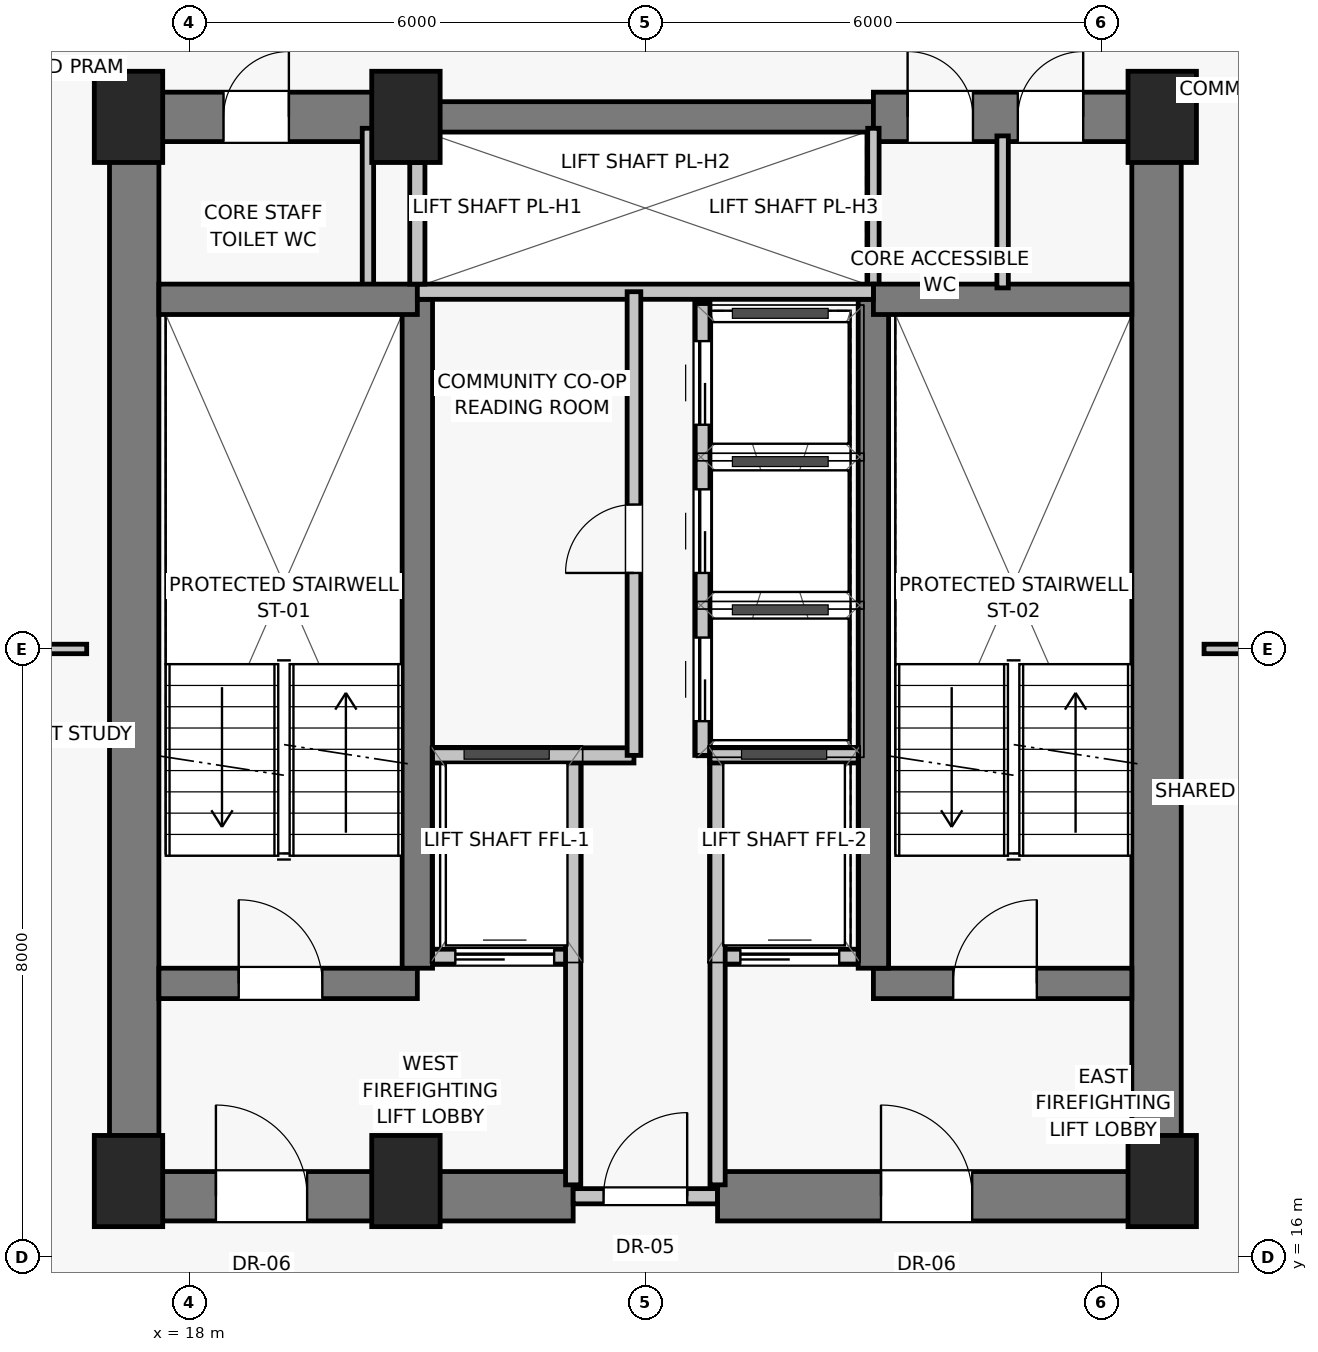
"""IFC4 building model, lengths in metres.
Left out: names, types, materials, properties, quantities, classifications, styles, units other than length and angle.
Written with IfcOpenShell. Run it as: python <this file> out.ifc"""

import sys

from ifc_helpers import new_model, si_unit, direction, frame, frame_2d, origin, origin_2d, place, context, subcontext, project, spatial, rectangle, extrude, source, transform, mapped, element, fill, save


model = new_model("IFC4")
c1 = context("Model", 3, precision=1e-05, world=origin(), true_north=direction((0.0, 1.0)))
c2 = subcontext(c1, "Body", "Model", "MODEL_VIEW")
j1 = project(units=[si_unit("LENGTHUNIT", "METRE"), si_unit("PLANEANGLEUNIT", "RADIAN")], contexts=[c1])
p1 = place(None, origin())
s1 = spatial("IfcSite", under=j1, at=p1, CompositionType="ELEMENT")
p2 = place(p1, origin())
s2 = spatial("IfcBuilding", under=s1, at=p2, CompositionType="ELEMENT")
p3 = place(p2, frame((0.0, 0.0, 95.95)))
s3 = spatial("IfcBuildingStorey", under=s2, at=p3, CompositionType="ELEMENT", Elevation=95.95)
for number, where, z_axis, x_axis in (
    (1, (17.2, 17.0, 0.0), (0.0, 0.0, 1.0), (1.0, 0.0, 0.0)),
    (2, (20.85, 17.0, 0.0), (0.0, 0.0, 1.0), (1.0, 0.0, 0.0)),
    (3, (30.8, 17.0, 0.0), (0.0, 0.0, 1.0), (1.0, 0.0, 0.0)),
    (4, (17.2, 31.0, 0.0), (0.0, 0.0, 1.0), (1.0, 0.0, 0.0)),
    (5, (20.85, 31.0, 0.0), (0.0, 0.0, 1.0), (1.0, 0.0, 0.0)),
    (6, (30.8, 31.0, 0.0), (0.0, 0.0, 1.0), (1.0, 0.0, 0.0)),
):
    element("IfcColumn", number, at=place(p3, frame(where, z_axis=z_axis, x_axis=x_axis)), inside=s3, PredefinedType="PILASTER", context=c2, shape_type="SweptSolid", body=[
        extrude(rectangle(XDim=0.9, YDim=1.2, at=origin_2d()), origin(), (0.0, 0.0, 1.0), 3.25),
    ])
for number, where, z_axis, x_axis in (
    (7, (17.275, 16.8, 0.0), (0.0, 0.0, 1.0), (0.0, 1.0, 0.0)),
    (8, (30.725, 16.8, 0.0), (0.0, 0.0, 1.0), (0.0, 1.0, 0.0)),
):
    element("IfcWall", number, at=place(p3, frame(where, z_axis=z_axis, x_axis=x_axis)), inside=s3, PredefinedType="SHEAR", context=c2, shape_type="SweptSolid", body=[
        extrude(rectangle(XDim=14.2, YDim=0.65, at=frame_2d((7.1, 0.0))), origin(), (0.0, 0.0, 1.0), 3.0),
    ])
p4 = place(p3, frame((17.2, 16.8, 0.0), z_axis=(0.0, 0.0, 1.0), x_axis=(1.0, 0.0, 0.0)))
e9 = element("IfcWall", 9, at=p4, inside=s3, PredefinedType="SHEAR", context=c2, shape_type="SweptSolid", body=[
    extrude(rectangle(XDim=5.85, YDim=0.65, at=frame_2d((2.925, 0.0))), origin(), (0.0, 0.0, 1.0), 3.0),
])
p5 = place(p4, frame((1.15, 0.0, 0.0)))
e10 = element("IfcOpeningElement", 10, at=p5, cuts=e9, PredefinedType="OPENING", context=c2, shape_type="SweptSolid", body=[
    extrude(rectangle(XDim=1.2, YDim=2.03, at=frame_2d((0.6, 1.015))), frame((0.0, 0.335, 0.0), z_axis=(0.0, -1.0, 0.0), x_axis=(1.0, 0.0, 0.0)), (0.0, 0.0, 1.0), 0.67),
])
p6 = place(p3, frame((23.05, 16.8, 0.0), z_axis=(0.0, 0.0, 1.0), x_axis=(1.0, 0.0, 0.0)))
e11 = element("IfcWall", 11, at=p6, inside=s3, PredefinedType="SOLIDWALL", context=c2, shape_type="SweptSolid", body=[
    extrude(rectangle(XDim=1.9, YDim=0.2, at=frame_2d((0.95, 0.0))), origin(), (0.0, 0.0, 1.0), 2.15),
])
p7 = place(p6, frame((0.4, 0.0, 0.0)))
e12 = element("IfcOpeningElement", 12, at=p7, cuts=e11, PredefinedType="OPENING", context=c2, shape_type="SweptSolid", body=[
    extrude(rectangle(XDim=1.1, YDim=2.03, at=frame_2d((0.55, 1.015))), frame((0.0, 0.11, 0.0), z_axis=(0.0, -1.0, 0.0), x_axis=(1.0, 0.0, 0.0)), (0.0, 0.0, 1.0), 0.22),
])
p8 = place(p3, frame((24.95, 16.8, 0.0), z_axis=(0.0, 0.0, 1.0), x_axis=(1.0, 0.0, 0.0)))
e13 = element("IfcWall", 13, at=p8, inside=s3, PredefinedType="SHEAR", context=c2, shape_type="SweptSolid", body=[
    extrude(rectangle(XDim=5.85, YDim=0.65, at=frame_2d((2.925, 0.0))), origin(), (0.0, 0.0, 1.0), 3.0),
])
p9 = place(p8, frame((2.15, 0.0, 0.0)))
e14 = element("IfcOpeningElement", 14, at=p9, cuts=e13, PredefinedType="OPENING", context=c2, shape_type="SweptSolid", body=[
    extrude(rectangle(XDim=1.2, YDim=2.03, at=frame_2d((0.6, 1.015))), frame((0.0, 0.335, 0.0), z_axis=(0.0, -1.0, 0.0), x_axis=(1.0, 0.0, 0.0)), (0.0, 0.0, 1.0), 0.67),
])
p10 = place(p3, frame((17.2, 31.0, 0.0), z_axis=(0.0, 0.0, 1.0), x_axis=(1.0, 0.0, 0.0)))
e15 = element("IfcWall", 15, at=p10, inside=s3, PredefinedType="SHEAR", context=c2, shape_type="SweptSolid", body=[
    extrude(rectangle(XDim=3.8, YDim=0.65, at=frame_2d((1.9, 0.0))), origin(), (0.0, 0.0, 1.0), 3.0),
])
p11 = place(p10, frame((1.25, 0.0, 0.0)))
e16 = element("IfcOpeningElement", 16, at=p11, cuts=e15, PredefinedType="OPENING", context=c2, shape_type="SweptSolid", body=[
    extrude(rectangle(XDim=0.86, YDim=2.01, at=frame_2d((0.43, 1.005))), frame((0.0, 0.335, 0.0), z_axis=(0.0, -1.0, 0.0), x_axis=(1.0, 0.0, 0.0)), (0.0, 0.0, 1.0), 0.67),
])
p12 = place(p3, frame((21.0, 31.0, 0.0), z_axis=(0.0, 0.0, 1.0), x_axis=(1.0, 0.0, 0.0)))
e17 = element("IfcWall", 17, at=p12, inside=s3, PredefinedType="SHEAR", context=c2, shape_type="SweptSolid", body=[
    extrude(rectangle(XDim=6.0, YDim=0.4, at=frame_2d((3.0, 0.0))), origin(), (0.0, 0.0, 1.0), 3.0),
])
p13 = place(p3, frame((27.0, 31.0, 0.0), z_axis=(0.0, 0.0, 1.0), x_axis=(1.0, 0.0, 0.0)))
e18 = element("IfcWall", 18, at=p13, inside=s3, PredefinedType="SHEAR", context=c2, shape_type="SweptSolid", body=[
    extrude(rectangle(XDim=3.8, YDim=0.65, at=frame_2d((1.9, 0.0))), origin(), (0.0, 0.0, 1.0), 3.0),
])
p14 = place(p13, frame((0.45, 0.0, 0.0)))
e19 = element("IfcOpeningElement", 19, at=p14, cuts=e18, PredefinedType="OPENING", context=c2, shape_type="SweptSolid", body=[
    extrude(rectangle(XDim=0.86, YDim=2.01, at=frame_2d((0.43, 1.005))), frame((0.0, 0.335, 0.0), z_axis=(0.0, -1.0, 0.0), x_axis=(1.0, 0.0, 0.0)), (0.0, 0.0, 1.0), 0.67),
])
p15 = place(p13, frame((1.9, 0.0, 0.0)))
e20 = element("IfcOpeningElement", 20, at=p15, cuts=e18, PredefinedType="OPENING", context=c2, shape_type="SweptSolid", body=[
    extrude(rectangle(XDim=0.86, YDim=2.01, at=frame_2d((0.43, 1.005))), frame((0.0, 0.335, 0.0), z_axis=(0.0, -1.0, 0.0), x_axis=(1.0, 0.0, 0.0)), (0.0, 0.0, 1.0), 0.67),
])
for number, where, z_axis, x_axis in (
    (21, (20.35, 28.65, 0.0), (0.0, 0.0, 1.0), (0.0, 1.0, 0.0)),
    (22, (27.0, 28.65, 0.0), (0.0, 0.0, 1.0), (0.0, 1.0, 0.0)),
):
    element("IfcWall", number, at=place(p3, frame(where, z_axis=z_axis, x_axis=x_axis)), inside=s3, PredefinedType="PARTITIONING", context=c2, shape_type="SweptSolid", body=[
        extrude(rectangle(XDim=2.2, YDim=0.15, at=frame_2d((1.1, 0.0))), origin(), (0.0, 0.0, 1.0), 3.0),
    ])
p16 = place(p3, frame((17.6, 19.6, 0.0), z_axis=(0.0, 0.0, 1.0), x_axis=(1.0, 0.0, 0.0)))
e23 = element("IfcWall", 23, at=p16, inside=s3, PredefinedType="SHEAR", context=c2, shape_type="SweptSolid", body=[
    extrude(rectangle(XDim=3.4, YDim=0.4, at=frame_2d((1.7, 0.0))), origin(), (0.0, 0.0, 1.0), 3.0),
])
p17 = place(p16, frame((1.05, 0.0, 0.0)))
e24 = element("IfcOpeningElement", 24, at=p17, cuts=e23, PredefinedType="OPENING", context=c2, shape_type="SweptSolid", body=[
    extrude(rectangle(XDim=1.1, YDim=2.03, at=frame_2d((0.55, 1.015))), frame((0.0, 0.21, 0.0), z_axis=(0.0, -1.0, 0.0), x_axis=(1.0, 0.0, 0.0)), (0.0, 0.0, 1.0), 0.42),
])
p18 = place(p3, frame((21.2, 19.95, 0.0), z_axis=(0.0, 0.0, 1.0), x_axis=(1.0, 0.0, 0.0)))
e25 = element("IfcWall", 25, at=p18, inside=s3, PredefinedType="SOLIDWALL", context=c2, shape_type="SweptSolid", body=[
    extrude(rectangle(XDim=1.85, YDim=0.2, at=frame_2d((0.925, 0.0))), origin(), (0.0, 0.0, 1.0), 3.0),
])
p19 = place(p18, frame((0.3, 0.0, 0.0)))
e26 = element("IfcOpeningElement", 26, at=p19, cuts=e25, PredefinedType="OPENING", context=c2, shape_type="SweptSolid", body=[
    extrude(rectangle(XDim=1.3, YDim=2.25, at=frame_2d((0.65, 1.125))), frame((0.0, 0.11, 0.0), z_axis=(0.0, -1.0, 0.0), x_axis=(1.0, 0.0, 0.0)), (0.0, 0.0, 1.0), 0.22),
])
p20 = place(p3, frame((24.95, 19.95, 0.0), z_axis=(0.0, 0.0, 1.0), x_axis=(1.0, 0.0, 0.0)))
e27 = element("IfcWall", 27, at=p20, inside=s3, PredefinedType="SOLIDWALL", context=c2, shape_type="SweptSolid", body=[
    extrude(rectangle(XDim=1.85, YDim=0.2, at=frame_2d((0.925, 0.0))), origin(), (0.0, 0.0, 1.0), 3.0),
])
p21 = place(p20, frame((0.3, 0.0, 0.0)))
e28 = element("IfcOpeningElement", 28, at=p21, cuts=e27, PredefinedType="OPENING", context=c2, shape_type="SweptSolid", body=[
    extrude(rectangle(XDim=1.3, YDim=2.25, at=frame_2d((0.65, 1.125))), frame((0.0, 0.11, 0.0), z_axis=(0.0, -1.0, 0.0), x_axis=(1.0, 0.0, 0.0)), (0.0, 0.0, 1.0), 0.22),
])
p22 = place(p3, frame((27.0, 19.6, 0.0), z_axis=(0.0, 0.0, 1.0), x_axis=(1.0, 0.0, 0.0)))
e29 = element("IfcWall", 29, at=p22, inside=s3, PredefinedType="SHEAR", context=c2, shape_type="SweptSolid", body=[
    extrude(rectangle(XDim=3.4, YDim=0.4, at=frame_2d((1.7, 0.0))), origin(), (0.0, 0.0, 1.0), 3.0),
])
p23 = place(p22, frame((1.05, 0.0, 0.0)))
e30 = element("IfcOpeningElement", 30, at=p23, cuts=e29, PredefinedType="OPENING", context=c2, shape_type="SweptSolid", body=[
    extrude(rectangle(XDim=1.1, YDim=2.03, at=frame_2d((0.55, 1.015))), frame((0.0, 0.21, 0.0), z_axis=(0.0, -1.0, 0.0), x_axis=(1.0, 0.0, 0.0)), (0.0, 0.0, 1.0), 0.42),
])
for number, where, z_axis, x_axis in (
    (31, (21.0, 19.8, 0.0), (0.0, 0.0, 1.0), (0.0, 1.0, 0.0)),
    (32, (27.0, 19.8, 0.0), (0.0, 0.0, 1.0), (0.0, 1.0, 0.0)),
):
    element("IfcWall", number, at=place(p3, frame(where, z_axis=z_axis, x_axis=x_axis)), inside=s3, PredefinedType="SHEAR", context=c2, shape_type="SweptSolid", body=[
        extrude(rectangle(XDim=8.8, YDim=0.4, at=frame_2d((4.4, 0.0))), origin(), (0.0, 0.0, 1.0), 3.0),
    ])
for number, where, z_axis, x_axis in (
    (33, (17.6, 28.6, 0.0), (0.0, 0.0, 1.0), (1.0, 0.0, 0.0)),
    (34, (27.0, 28.6, 0.0), (0.0, 0.0, 1.0), (1.0, 0.0, 0.0)),
):
    element("IfcWall", number, at=place(p3, frame(where, z_axis=z_axis, x_axis=x_axis)), inside=s3, PredefinedType="SHEAR", context=c2, shape_type="SweptSolid", body=[
        extrude(rectangle(XDim=3.4, YDim=0.4, at=frame_2d((1.7, 0.0))), origin(), (0.0, 0.0, 1.0), 3.0),
    ])
for number, where, z_axis, x_axis in (
    (35, (23.05, 16.95, 0.0), (0.0, 0.0, 1.0), (0.0, 1.0, 0.0)),
    (36, (24.95, 16.95, 0.0), (0.0, 0.0, 1.0), (0.0, 1.0, 0.0)),
):
    element("IfcWall", number, at=place(p3, frame(where, z_axis=z_axis, x_axis=x_axis)), inside=s3, PredefinedType="SOLIDWALL", context=c2, shape_type="SweptSolid", body=[
        extrude(rectangle(XDim=5.6, YDim=0.2, at=frame_2d((2.8, 0.0))), origin(), (0.0, 0.0, 1.0), 3.0),
    ])
p24 = place(p3, frame((21.2, 22.6, 0.0), z_axis=(0.0, 0.0, 1.0), x_axis=(1.0, 0.0, 0.0)))
e37 = element("IfcWall", 37, at=p24, inside=s3, PredefinedType="SOLIDWALL", context=c2, shape_type="SweptSolid", body=[
    extrude(rectangle(XDim=2.65, YDim=0.2, at=frame_2d((1.325, 0.0))), origin(), (0.0, 0.0, 1.0), 3.0),
])
p25 = place(p3, frame((24.85, 22.6, 0.0), z_axis=(0.0, 0.0, 1.0), x_axis=(1.0, 0.0, 0.0)))
e38 = element("IfcWall", 38, at=p25, inside=s3, PredefinedType="SOLIDWALL", context=c2, shape_type="SweptSolid", body=[
    extrude(rectangle(XDim=1.95, YDim=0.2, at=frame_2d((0.975, 0.0))), origin(), (0.0, 0.0, 1.0), 3.0),
])
p26 = place(p3, frame((21.0, 28.7, 0.0), z_axis=(0.0, 0.0, 1.0), x_axis=(1.0, 0.0, 0.0)))
e39 = element("IfcWall", 39, at=p26, inside=s3, PredefinedType="SOLIDWALL", context=c2, shape_type="SweptSolid", body=[
    extrude(rectangle(XDim=6.0, YDim=0.2, at=frame_2d((3.0, 0.0))), origin(), (0.0, 0.0, 1.0), 3.0),
])
p27 = place(p3, frame((21.0, 28.8, 0.0), z_axis=(0.0, 0.0, 1.0), x_axis=(0.0, 1.0, 0.0)))
e40 = element("IfcWall", 40, at=p27, inside=s3, PredefinedType="SOLIDWALL", context=c2, shape_type="SweptSolid", body=[
    extrude(rectangle(XDim=1.6, YDim=0.2, at=frame_2d((0.8, 0.0))), origin(), (0.0, 0.0, 1.0), 3.0),
])
p28 = place(p3, frame((23.85, 22.6, 0.0), z_axis=(0.0, 0.0, 1.0), x_axis=(0.0, 1.0, 0.0)))
e41 = element("IfcWall", 41, at=p28, inside=s3, PredefinedType="PARTITIONING", context=c2, shape_type="SweptSolid", body=[
    extrude(rectangle(XDim=6.1, YDim=0.18, at=frame_2d((3.05, 0.0))), origin(), (0.0, 0.0, 1.0), 3.0),
])
p29 = place(p28, frame((2.4, 0.0, 0.0)))
e42 = element("IfcOpeningElement", 42, at=p29, cuts=e41, PredefinedType="OPENING", context=c2, shape_type="SweptSolid", body=[
    extrude(rectangle(XDim=0.9, YDim=2.01, at=frame_2d((0.45, 1.005))), frame((0.0, 0.1, 0.0), z_axis=(0.0, -1.0, 0.0), x_axis=(1.0, 0.0, 0.0)), (0.0, 0.0, 1.0), 0.2),
])
p30 = place(p3, frame((24.75, 22.6, 0.0), z_axis=(0.0, 0.0, 1.0), x_axis=(0.0, 1.0, 0.0)))
e43 = element("IfcWall", 43, at=p30, inside=s3, PredefinedType="SOLIDWALL", context=c2, shape_type="SweptSolid", body=[
    extrude(rectangle(XDim=5.95, YDim=0.2, at=frame_2d((2.975, 0.0))), origin(), (0.0, 0.0, 1.0), 3.0),
])
p31 = place(p30, frame((0.45, 0.0, 0.0)))
e44 = element("IfcOpeningElement", 44, at=p31, cuts=e43, PredefinedType="OPENING", context=c2, shape_type="SweptSolid", body=[
    extrude(rectangle(XDim=1.1, YDim=2.08, at=frame_2d((0.55, 1.04))), frame((0.0, 0.11, 0.0), z_axis=(0.0, -1.0, 0.0), x_axis=(1.0, 0.0, 0.0)), (0.0, 0.0, 1.0), 0.22),
])
p32 = place(p30, frame((2.4, 0.0, 0.0)))
e45 = element("IfcOpeningElement", 45, at=p32, cuts=e43, PredefinedType="OPENING", context=c2, shape_type="SweptSolid", body=[
    extrude(rectangle(XDim=1.1, YDim=2.08, at=frame_2d((0.55, 1.04))), frame((0.0, 0.11, 0.0), z_axis=(0.0, -1.0, 0.0), x_axis=(1.0, 0.0, 0.0)), (0.0, 0.0, 1.0), 0.22),
])
p33 = place(p30, frame((4.35, 0.0, 0.0)))
e46 = element("IfcOpeningElement", 46, at=p33, cuts=e43, PredefinedType="OPENING", context=c2, shape_type="SweptSolid", body=[
    extrude(rectangle(XDim=1.1, YDim=2.08, at=frame_2d((0.55, 1.04))), frame((0.0, 0.11, 0.0), z_axis=(0.0, -1.0, 0.0), x_axis=(1.0, 0.0, 0.0)), (0.0, 0.0, 1.0), 0.22),
])
p34 = place(p3, frame((28.7, 28.75, 0.0), z_axis=(0.0, 0.0, 1.0), x_axis=(0.0, 1.0, 0.0)))
e47 = element("IfcWall", 47, at=p34, inside=s3, PredefinedType="PARTITIONING", context=c2, shape_type="SweptSolid", body=[
    extrude(rectangle(XDim=2.0, YDim=0.15, at=frame_2d((1.0, 0.0))), origin(), (0.0, 0.0, 1.0), 3.0),
])
for number, where, z_axis, x_axis in (
    (48, (14.55, 24.0, 0.0), (0.0, 0.0, 1.0), (1.0, 0.0, 0.0)),
    (49, (31.35, 24.0, 0.0), (0.0, 0.0, 1.0), (1.0, 0.0, 0.0)),
):
    element("IfcWall", number, at=place(p3, frame(where, z_axis=z_axis, x_axis=x_axis)), inside=s3, PredefinedType="PARTITIONING", context=c2, shape_type="SweptSolid", body=[
        extrude(rectangle(XDim=2.1, YDim=0.125, at=frame_2d((1.05, 0.0))), origin(), (0.0, 0.0, 1.0), 3.0),
    ])
m1 = source(origin(), c2, "Body", "SweptSolid", [
    extrude(rectangle(XDim=1.2, YDim=2.03, at=frame_2d((0.6, 1.015))), frame((0.0, 0.025, 0.0), z_axis=(0.0, -1.0, 0.0), x_axis=(1.0, 0.0, 0.0)), (0.0, 0.0, 1.0), 0.05),
])
p35 = place(p5, origin())
e50 = element("IfcDoor", 50, at=p35, inside=s3, OperationType="SINGLE_SWING_LEFT", PredefinedType="DOOR", context=c2, shape_type="MappedRepresentation", body=[
    mapped(m1, transform((0.0, 0.0, 0.0), scale=1.0)),
])
fill(e10, e50)
m2 = source(origin(), c2, "Body", "SweptSolid", [
    extrude(rectangle(XDim=1.1, YDim=2.03, at=frame_2d((0.55, 1.015))), frame((0.0, 0.025, 0.0), z_axis=(0.0, -1.0, 0.0), x_axis=(1.0, 0.0, 0.0)), (0.0, 0.0, 1.0), 0.05),
])
p36 = place(p7, origin())
e51 = element("IfcDoor", 51, at=p36, inside=s3, OperationType="SINGLE_SWING_RIGHT", PredefinedType="DOOR", context=c2, shape_type="MappedRepresentation", body=[
    mapped(m2, transform((0.0, 0.0, 0.0), scale=1.0)),
])
fill(e12, e51)
p37 = place(p9, origin())
e52 = element("IfcDoor", 52, at=p37, inside=s3, OperationType="SINGLE_SWING_LEFT", PredefinedType="DOOR", context=c2, shape_type="MappedRepresentation", body=[
    mapped(m1, transform((0.0, 0.0, 0.0), scale=1.0)),
])
fill(e14, e52)
m3 = source(origin(), c2, "Body", "SweptSolid", [
    extrude(rectangle(XDim=0.86, YDim=2.01, at=frame_2d((0.43, 1.005))), frame((0.0, 0.025, 0.0), z_axis=(0.0, -1.0, 0.0), x_axis=(1.0, 0.0, 0.0)), (0.0, 0.0, 1.0), 0.05),
])
p38 = place(p11, origin())
e53 = element("IfcDoor", 53, at=p38, inside=s3, OperationType="SINGLE_SWING_RIGHT", PredefinedType="DOOR", context=c2, shape_type="MappedRepresentation", body=[
    mapped(m3, transform((0.0, 0.0, 0.0), scale=1.0)),
])
fill(e16, e53)
p39 = place(p14, origin())
e54 = element("IfcDoor", 54, at=p39, inside=s3, OperationType="SINGLE_SWING_LEFT", PredefinedType="DOOR", context=c2, shape_type="MappedRepresentation", body=[
    mapped(m3, transform((0.0, 0.0, 0.0), scale=1.0)),
])
fill(e19, e54)
p40 = place(p15, origin())
e55 = element("IfcDoor", 55, at=p40, inside=s3, OperationType="SINGLE_SWING_RIGHT", PredefinedType="DOOR", context=c2, shape_type="MappedRepresentation", body=[
    mapped(m3, transform((0.0, 0.0, 0.0), scale=1.0)),
])
fill(e20, e55)
p41 = place(p17, origin())
e56 = element("IfcDoor", 56, at=p41, inside=s3, OperationType="SINGLE_SWING_LEFT", PredefinedType="DOOR", context=c2, shape_type="MappedRepresentation", body=[
    mapped(m2, transform((0.0, 0.0, 0.0), scale=1.0)),
])
fill(e24, e56)
m4 = source(origin(), c2, "Body", "SweptSolid", [
    extrude(rectangle(XDim=1.3, YDim=2.25, at=frame_2d((0.65, 1.125))), frame((0.0, 0.025, 0.0), z_axis=(0.0, -1.0, 0.0), x_axis=(1.0, 0.0, 0.0)), (0.0, 0.0, 1.0), 0.05),
])
p42 = place(p19, origin())
e57 = element("IfcDoor", 57, at=p42, inside=s3, OperationType="SLIDING_TO_LEFT", PredefinedType="DOOR", context=c2, shape_type="MappedRepresentation", body=[
    mapped(m4, transform((0.0, 0.0, 0.0), scale=1.0)),
])
fill(e26, e57)
p43 = place(p21, origin())
e58 = element("IfcDoor", 58, at=p43, inside=s3, OperationType="SLIDING_TO_LEFT", PredefinedType="DOOR", context=c2, shape_type="MappedRepresentation", body=[
    mapped(m4, transform((0.0, 0.0, 0.0), scale=1.0)),
])
fill(e28, e58)
p44 = place(p23, origin())
e59 = element("IfcDoor", 59, at=p44, inside=s3, OperationType="SINGLE_SWING_RIGHT", PredefinedType="DOOR", context=c2, shape_type="MappedRepresentation", body=[
    mapped(m2, transform((0.0, 0.0, 0.0), scale=1.0)),
])
fill(e30, e59)
m5 = source(origin(), c2, "Body", "SweptSolid", [
    extrude(rectangle(XDim=0.9, YDim=2.01, at=frame_2d((0.45, 1.005))), frame((0.0, 0.025, 0.0), z_axis=(0.0, -1.0, 0.0), x_axis=(1.0, 0.0, 0.0)), (0.0, 0.0, 1.0), 0.05),
])
p45 = place(p29, origin())
e60 = element("IfcDoor", 60, at=p45, inside=s3, OperationType="SINGLE_SWING_LEFT", PredefinedType="DOOR", context=c2, shape_type="MappedRepresentation", body=[
    mapped(m5, transform((0.0, 0.0, 0.0), scale=1.0)),
])
fill(e42, e60)
m6 = source(origin(), c2, "Body", "SweptSolid", [
    extrude(rectangle(XDim=1.1, YDim=2.08, at=frame_2d((0.55, 1.04))), frame((0.0, 0.025, 0.0), z_axis=(0.0, -1.0, 0.0), x_axis=(1.0, 0.0, 0.0)), (0.0, 0.0, 1.0), 0.05),
])
p46 = place(p31, origin())
e61 = element("IfcDoor", 61, at=p46, inside=s3, OperationType="SLIDING_TO_LEFT", PredefinedType="DOOR", context=c2, shape_type="MappedRepresentation", body=[
    mapped(m6, transform((0.0, 0.0, 0.0), scale=1.0)),
])
fill(e44, e61)
p47 = place(p32, origin())
e62 = element("IfcDoor", 62, at=p47, inside=s3, OperationType="SLIDING_TO_LEFT", PredefinedType="DOOR", context=c2, shape_type="MappedRepresentation", body=[
    mapped(m6, transform((0.0, 0.0, 0.0), scale=1.0)),
])
fill(e45, e62)
p48 = place(p33, origin())
e63 = element("IfcDoor", 63, at=p48, inside=s3, OperationType="SLIDING_TO_LEFT", PredefinedType="DOOR", context=c2, shape_type="MappedRepresentation", body=[
    mapped(m6, transform((0.0, 0.0, 0.0), scale=1.0)),
])
fill(e46, e63)
save(model, sys.argv[1])
